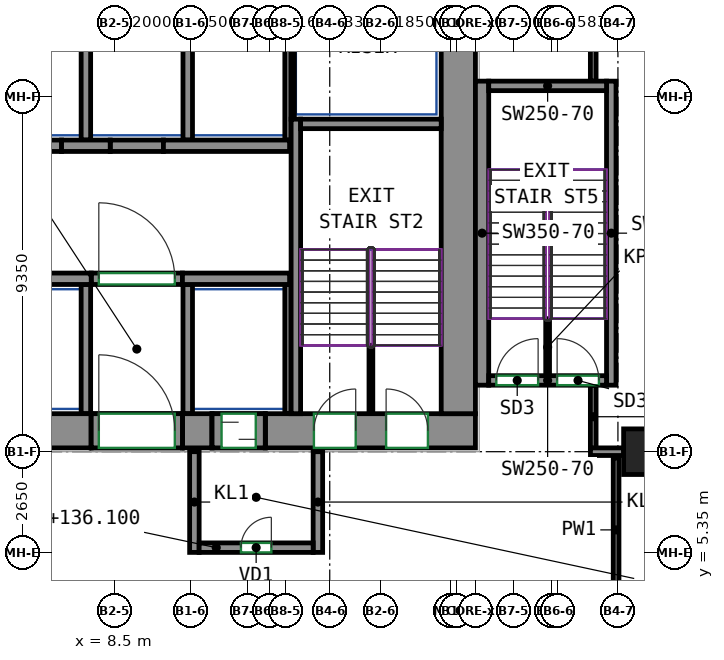
"""IFC4 building model, lengths in metres.
Left out: names, types, materials, properties, quantities, classifications, styles, units other than length and angle.
Written with IfcOpenShell. Run it as: python <this file> out.ifc"""

import sys

from ifc_helpers import new_model, si_unit, direction, frame, frame_2d, origin, origin_2d, place, context, subcontext, project, spatial, rectangle, extrude, source, transform, mapped, element, fill, save


model = new_model("IFC4")
c1 = context("Model", 3, precision=1e-05, world=origin(), true_north=direction((0.0, 1.0)))
c2 = subcontext(c1, "Body", "Model", "MODEL_VIEW")
j1 = project(units=[si_unit("LENGTHUNIT", "METRE"), si_unit("PLANEANGLEUNIT", "RADIAN")], contexts=[c1])
p1 = place(None, origin())
s1 = spatial("IfcSite", under=j1, at=p1, CompositionType="ELEMENT")
p2 = place(p1, origin())
s2 = spatial("IfcBuilding", under=s1, at=p2, CompositionType="ELEMENT")
p3 = place(p2, frame((0.0, 0.0, 128.6)))
s3 = spatial("IfcBuildingStorey", under=s2, at=p3, CompositionType="ELEMENT", Elevation=128.6)
m1 = source(origin(), c2, "Body", "SweptSolid", [
    extrude(rectangle(XDim=1.2, YDim=1.2, at=origin_2d()), origin(), (0.0, 0.0, 1.0), 5.5),
])
p4 = place(p3, frame((22.5, 8.0, 0.0), z_axis=(0.0, 0.0, 1.0), x_axis=(1.0, 0.0, 0.0)))
e1 = element("IfcColumn", 1, at=p4, inside=s3, PredefinedType="COLUMN", context=c2, shape_type="MappedRepresentation", body=[
    mapped(m1, transform((0.0, 0.0, 0.0))),
])
m2 = source(origin(), c2, "Body", "SweptSolid", [
    extrude(rectangle(XDim=14.18, YDim=0.9, at=frame_2d((7.09, 0.0))), origin(), (0.0, 0.0, 1.0), 9.5),
])
p5 = place(p3, frame((-6.29, 8.55, 0.0), z_axis=(0.0, 0.0, 1.0), x_axis=(1.0, 0.0, 0.0)))
e2 = element("IfcWall", 2, at=p5, inside=s3, PredefinedType="SHEAR", context=c2, shape_type="MappedRepresentation", body=[
    mapped(m2, transform((0.0, 0.0, 0.0))),
])
m3 = source(origin(), c2, "Body", "SweptSolid", [
    extrude(rectangle(XDim=0.78, YDim=0.9, at=frame_2d((0.39, 0.0))), origin(), (0.0, 0.0, 1.0), 9.5),
])
p6 = place(p3, frame((10.29, 8.55, 0.0), z_axis=(0.0, 0.0, 1.0), x_axis=(1.0, 0.0, 0.0)))
e3 = element("IfcWall", 3, at=p6, inside=s3, PredefinedType="SHEAR", context=c2, shape_type="MappedRepresentation", body=[
    mapped(m3, transform((0.0, 0.0, 0.0))),
])
m4 = source(origin(), c2, "Body", "SweptSolid", [
    extrude(rectangle(XDim=5.53, YDim=0.9, at=frame_2d((2.765, 0.0))), origin(), (0.0, 0.0, 1.0), 9.5),
])
p7 = place(p3, frame((12.47, 8.55, 0.0), z_axis=(0.0, 0.0, 1.0), x_axis=(1.0, 0.0, 0.0)))
e4 = element("IfcWall", 4, at=p7, inside=s3, PredefinedType="SHEAR", context=c2, shape_type="MappedRepresentation", body=[
    mapped(m4, transform((0.0, 0.0, 0.0))),
])
p8 = place(p7, frame((1.28, 0.0, 0.0)))
e5 = element("IfcOpeningElement", 5, at=p8, cuts=e4, PredefinedType="OPENING", context=c2, shape_type="SweptSolid", body=[
    extrude(rectangle(XDim=1.1, YDim=2.1, at=frame_2d((0.55, 1.05))), frame((0.0, 0.46, 0.0), z_axis=(0.0, -1.0, 0.0), x_axis=(1.0, 0.0, 0.0)), (0.0, 0.0, 1.0), 0.92),
])
p9 = place(p7, frame((3.18, 0.0, 0.0)))
e6 = element("IfcOpeningElement", 6, at=p9, cuts=e4, PredefinedType="OPENING", context=c2, shape_type="SweptSolid", body=[
    extrude(rectangle(XDim=1.1, YDim=2.1, at=frame_2d((0.55, 1.05))), frame((0.0, 0.46, 0.0), z_axis=(0.0, -1.0, 0.0), x_axis=(1.0, 0.0, 0.0)), (0.0, 0.0, 1.0), 0.92),
])
m5 = source(origin(), c2, "Body", "SweptSolid", [
    extrude(rectangle(XDim=12.0, YDim=0.9, at=frame_2d((6.0, 0.0))), origin(), (0.0, 0.0, 1.0), 9.5),
])
p10 = place(p3, frame((17.55, 9.0, 0.0), z_axis=(0.0, 0.0, 1.0), x_axis=(0.0, 1.0, 0.0)))
e7 = element("IfcWall", 7, at=p10, inside=s3, PredefinedType="SHEAR", context=c2, shape_type="MappedRepresentation", body=[
    mapped(m5, transform((0.0, 0.0, 0.0))),
])
m6 = source(origin(), c2, "Body", "SweptSolid", [
    extrude(rectangle(XDim=7.75, YDim=0.25, at=frame_2d((3.875, 0.0))), origin(), (0.0, 0.0, 1.0), 9.5),
])
p11 = place(p3, frame((13.275, 9.0, 0.0), z_axis=(0.0, 0.0, 1.0), x_axis=(0.0, 1.0, 0.0)))
e8 = element("IfcWall", 8, at=p11, inside=s3, PredefinedType="SHEAR", context=c2, shape_type="MappedRepresentation", body=[
    mapped(m6, transform((0.0, 0.0, 0.0))),
])
m7 = source(origin(), c2, "Body", "SweptSolid", [
    extrude(rectangle(XDim=3.7, YDim=0.25, at=frame_2d((1.85, 0.0))), origin(), (0.0, 0.0, 1.0), 9.5),
])
p12 = place(p3, frame((13.4, 16.625, 0.0), z_axis=(0.0, 0.0, 1.0), x_axis=(1.0, 0.0, 0.0)))
e9 = element("IfcWall", 9, at=p12, inside=s3, PredefinedType="SHEAR", context=c2, shape_type="MappedRepresentation", body=[
    mapped(m7, transform((0.0, 0.0, 0.0))),
])
m8 = source(origin(), c2, "Body", "SweptSolid", [
    extrude(rectangle(XDim=8.0, YDim=0.35, at=frame_2d((4.0, 0.0))), origin(), (0.0, 0.0, 1.0), 9.5),
])
p13 = place(p3, frame((18.175, 9.75, 0.0), z_axis=(0.0, 0.0, 1.0), x_axis=(0.0, 1.0, 0.0)))
e10 = element("IfcWall", 10, at=p13, inside=s3, PredefinedType="SHEAR", context=c2, shape_type="MappedRepresentation", body=[
    mapped(m8, transform((0.0, 0.0, 0.0))),
])
m9 = source(origin(), c2, "Body", "SweptSolid", [
    extrude(rectangle(XDim=8.0, YDim=0.25, at=frame_2d((4.0, 0.0))), origin(), (0.0, 0.0, 1.0), 9.5),
])
p14 = place(p3, frame((21.575, 9.75, 0.0), z_axis=(0.0, 0.0, 1.0), x_axis=(0.0, 1.0, 0.0)))
e11 = element("IfcWall", 11, at=p14, inside=s3, PredefinedType="SHEAR", context=c2, shape_type="MappedRepresentation", body=[
    mapped(m9, transform((0.0, 0.0, 0.0))),
])
m10 = source(origin(), c2, "Body", "SweptSolid", [
    extrude(rectangle(XDim=3.1, YDim=0.25, at=frame_2d((1.55, 0.0))), origin(), (0.0, 0.0, 1.0), 9.5),
])
p15 = place(p3, frame((18.35, 9.875, 0.0), z_axis=(0.0, 0.0, 1.0), x_axis=(1.0, 0.0, 0.0)))
e12 = element("IfcWall", 12, at=p15, inside=s3, PredefinedType="SHEAR", context=c2, shape_type="MappedRepresentation", body=[
    mapped(m10, transform((0.0, 0.0, 0.0))),
])
p16 = place(p15, frame((0.2, 0.0, 0.0)))
e13 = element("IfcOpeningElement", 13, at=p16, cuts=e12, PredefinedType="OPENING", context=c2, shape_type="SweptSolid", body=[
    extrude(rectangle(XDim=1.1, YDim=2.1, at=frame_2d((0.55, 1.05))), frame((0.0, 0.135, 0.0), z_axis=(0.0, -1.0, 0.0), x_axis=(1.0, 0.0, 0.0)), (0.0, 0.0, 1.0), 0.27),
])
p17 = place(p15, frame((1.8, 0.0, 0.0)))
e14 = element("IfcOpeningElement", 14, at=p17, cuts=e12, PredefinedType="OPENING", context=c2, shape_type="SweptSolid", body=[
    extrude(rectangle(XDim=1.1, YDim=2.1, at=frame_2d((0.55, 1.05))), frame((0.0, 0.135, 0.0), z_axis=(0.0, -1.0, 0.0), x_axis=(1.0, 0.0, 0.0)), (0.0, 0.0, 1.0), 0.27),
])
p18 = place(p3, frame((18.35, 17.625, 0.0), z_axis=(0.0, 0.0, 1.0), x_axis=(1.0, 0.0, 0.0)))
e15 = element("IfcWall", 15, at=p18, inside=s3, PredefinedType="SHEAR", context=c2, shape_type="MappedRepresentation", body=[
    mapped(m10, transform((0.0, 0.0, 0.0))),
])
m11 = source(origin(), c2, "Body", "SweptSolid", [
    extrude(rectangle(XDim=18.9, YDim=0.3, at=frame_2d((9.45, 0.0))), origin(), (0.0, 0.0, 1.0), 9.5),
])
p19 = place(p3, frame((-11.01, 12.55, 0.0), z_axis=(0.0, 0.0, 1.0), x_axis=(1.0, 0.0, 0.0)))
e16 = element("IfcWall", 16, at=p19, inside=s3, PredefinedType="SHEAR", context=c2, shape_type="MappedRepresentation", body=[
    mapped(m11, transform((0.0, 0.0, 0.0))),
])
m12 = source(origin(), c2, "Body", "SweptSolid", [
    extrude(rectangle(XDim=2.82, YDim=0.3, at=frame_2d((1.41, 0.0))), origin(), (0.0, 0.0, 1.0), 9.5),
])
p20 = place(p3, frame((10.29, 12.55, 0.0), z_axis=(0.0, 0.0, 1.0), x_axis=(1.0, 0.0, 0.0)))
e17 = element("IfcWall", 17, at=p20, inside=s3, PredefinedType="SHEAR", context=c2, shape_type="MappedRepresentation", body=[
    mapped(m12, transform((0.0, 0.0, 0.0))),
])
m13 = source(origin(), c2, "Body", "SweptSolid", [
    extrude(rectangle(XDim=1.28, YDim=0.3, at=frame_2d((0.64, 0.0))), origin(), (0.0, 0.0, 1.0), 9.5),
])
p21 = place(p3, frame((7.11, 16.05, 0.0), z_axis=(0.0, 0.0, 1.0), x_axis=(1.0, 0.0, 0.0)))
e18 = element("IfcWall", 18, at=p21, inside=s3, PredefinedType="SHEAR", context=c2, shape_type="MappedRepresentation", body=[
    mapped(m13, transform((0.0, 0.0, 0.0))),
])
m14 = source(origin(), c2, "Body", "SweptSolid", [
    extrude(rectangle(XDim=3.32, YDim=0.3, at=frame_2d((1.66, 0.0))), origin(), (0.0, 0.0, 1.0), 9.5),
])
p22 = place(p3, frame((9.79, 16.05, 0.0), z_axis=(0.0, 0.0, 1.0), x_axis=(1.0, 0.0, 0.0)))
e19 = element("IfcWall", 19, at=p22, inside=s3, PredefinedType="SHEAR", context=c2, shape_type="MappedRepresentation", body=[
    mapped(m14, transform((0.0, 0.0, 0.0))),
])
m15 = source(origin(), c2, "Body", "SweptSolid", [
    extrude(rectangle(XDim=2.4, YDim=0.9, at=frame_2d((1.2, 0.0))), origin(), (0.0, 0.0, 1.0), 5.3),
])
p23 = place(p3, frame((7.89, 8.55, 4.2), z_axis=(0.0, 0.0, 1.0), x_axis=(1.0, 0.0, 0.0)))
e20 = element("IfcWall", 20, at=p23, inside=s3, PredefinedType="SHEAR", context=c2, shape_type="MappedRepresentation", body=[
    mapped(m15, transform((0.0, 0.0, 0.0))),
])
m16 = source(origin(), c2, "Body", "SweptSolid", [
    extrude(rectangle(XDim=1.4, YDim=0.9, at=frame_2d((0.7, 0.0))), origin(), (0.0, 0.0, 1.0), 5.55),
])
p24 = place(p3, frame((11.07, 8.55, 3.95), z_axis=(0.0, 0.0, 1.0), x_axis=(1.0, 0.0, 0.0)))
e21 = element("IfcWall", 21, at=p24, inside=s3, PredefinedType="SHEAR", context=c2, shape_type="MappedRepresentation", body=[
    mapped(m16, transform((0.0, 0.0, 0.0))),
])
m17 = source(origin(), c2, "Body", "SweptSolid", [
    extrude(rectangle(XDim=2.4, YDim=0.3, at=frame_2d((1.2, 0.0))), origin(), (0.0, 0.0, 1.0), 9.5),
])
p25 = place(p3, frame((7.89, 12.55, 0.0), z_axis=(0.0, 0.0, 1.0), x_axis=(1.0, 0.0, 0.0)))
e22 = element("IfcWall", 22, at=p25, inside=s3, PredefinedType="PARTITIONING", context=c2, shape_type="MappedRepresentation", body=[
    mapped(m17, transform((0.0, 0.0, 0.0))),
])
p26 = place(p25, frame((0.2, 0.0, 0.0)))
e23 = element("IfcOpeningElement", 23, at=p26, cuts=e22, PredefinedType="OPENING", context=c2, shape_type="SweptSolid", body=[
    extrude(rectangle(XDim=2.0, YDim=2.1, at=frame_2d((1.0, 1.05))), frame((0.0, 0.16, 0.0), z_axis=(0.0, -1.0, 0.0), x_axis=(1.0, 0.0, 0.0)), (0.0, 0.0, 1.0), 0.32),
])
m18 = source(origin(), c2, "Body", "SweptSolid", [
    extrude(rectangle(XDim=1.4, YDim=0.3, at=frame_2d((0.7, 0.0))), origin(), (0.0, 0.0, 1.0), 9.5),
])
for number, where, z_axis, x_axis in (
    (24, (5.71, 16.05, 0.0), (0.0, 0.0, 1.0), (1.0, 0.0, 0.0)),
    (25, (8.39, 16.05, 0.0), (0.0, 0.0, 1.0), (1.0, 0.0, 0.0)),
):
    element("IfcWall", number, at=place(p3, frame(where, z_axis=z_axis, x_axis=x_axis)), inside=s3, PredefinedType="PARTITIONING", context=c2, shape_type="MappedRepresentation", body=[
        mapped(m18, transform((0.0, 0.0, 0.0))),
    ])
m19 = source(origin(), c2, "Body", "SweptSolid", [
    extrude(rectangle(XDim=2.65, YDim=0.25, at=frame_2d((1.325, 0.0))), origin(), (0.0, 0.0, 1.0), 9.5),
])
p27 = place(p3, frame((10.605, 5.35, 0.0), z_axis=(0.0, 0.0, 1.0), x_axis=(0.0, 1.0, 0.0)))
e26 = element("IfcWall", 26, at=p27, inside=s3, PredefinedType="PARTITIONING", context=c2, shape_type="MappedRepresentation", body=[
    mapped(m19, transform((0.0, 0.0, 0.0))),
])
m20 = source(origin(), c2, "Body", "SweptSolid", [
    extrude(rectangle(XDim=2.65, YDim=0.25, at=frame_2d((1.325, 0.0))), origin(), (0.0, 0.0, 1.0), 7.5),
])
p28 = place(p3, frame((13.855, 5.35, 0.0), z_axis=(0.0, 0.0, 1.0), x_axis=(0.0, 1.0, 0.0)))
e27 = element("IfcWall", 27, at=p28, inside=s3, PredefinedType="PARTITIONING", context=c2, shape_type="MappedRepresentation", body=[
    mapped(m20, transform((0.0, 0.0, 0.0))),
])
m21 = source(origin(), c2, "Body", "SweptSolid", [
    extrude(rectangle(XDim=3.0, YDim=0.25, at=frame_2d((1.5, 0.0))), origin(), (0.0, 0.0, 1.0), 7.5),
])
p29 = place(p3, frame((10.73, 5.475, 0.0), z_axis=(0.0, 0.0, 1.0), x_axis=(1.0, 0.0, 0.0)))
e28 = element("IfcWall", 28, at=p29, inside=s3, PredefinedType="PARTITIONING", context=c2, shape_type="MappedRepresentation", body=[
    mapped(m21, transform((0.0, 0.0, 0.0))),
])
p30 = place(p29, frame((1.1, 0.0, 0.0)))
e29 = element("IfcOpeningElement", 29, at=p30, cuts=e28, PredefinedType="OPENING", context=c2, shape_type="SweptSolid", body=[
    extrude(rectangle(XDim=0.8, YDim=2.0, at=frame_2d((0.4, 1.0))), frame((0.0, 0.135, 0.0), z_axis=(0.0, -1.0, 0.0), x_axis=(1.0, 0.0, 0.0)), (0.0, 0.0, 1.0), 0.27),
])
m22 = source(origin(), c2, "Body", "SweptSolid", [
    extrude(rectangle(XDim=3.275, YDim=0.165, at=frame_2d((1.638, 0.0))), origin(), (0.0, 0.0, 1.0), 9.5),
])
p31 = place(p3, frame((13.067, 16.2, 0.0), z_axis=(0.0, 0.0, 1.0), x_axis=(0.0, 1.0, 0.0)))
e30 = element("IfcWall", 30, at=p31, inside=s3, PredefinedType="PARTITIONING", context=c2, shape_type="MappedRepresentation", body=[
    mapped(m22, transform((0.0, 0.0, 0.0))),
])
m23 = source(origin(), c2, "Body", "SweptSolid", [
    extrude(rectangle(XDim=3.275, YDim=0.25, at=frame_2d((1.638, 0.0))), origin(), (0.0, 0.0, 1.0), 9.5),
])
p32 = place(p3, frame((10.43, 16.2, 0.0), z_axis=(0.0, 0.0, 1.0), x_axis=(0.0, 1.0, 0.0)))
e31 = element("IfcWall", 31, at=p32, inside=s3, PredefinedType="PARTITIONING", context=c2, shape_type="MappedRepresentation", body=[
    mapped(m23, transform((0.0, 0.0, 0.0))),
])
m24 = source(origin(), c2, "Body", "SweptSolid", [
    extrude(rectangle(XDim=2.725, YDim=0.085, at=frame_2d((1.363, 0.0))), origin(), (0.0, 0.0, 1.0), 9.5),
])
p33 = place(p3, frame((13.192, 16.75, 0.0), z_axis=(0.0, 0.0, 1.0), x_axis=(0.0, 1.0, 0.0)))
e32 = element("IfcWall", 32, at=p33, inside=s3, PredefinedType="PARTITIONING", context=c2, shape_type="MappedRepresentation", body=[
    mapped(m24, transform((0.0, 0.0, 0.0))),
])
p34 = place(p3, frame((7.75, 16.2, 0.0), z_axis=(0.0, 0.0, 1.0), x_axis=(0.0, 1.0, 0.0)))
e33 = element("IfcWall", 33, at=p34, inside=s3, PredefinedType="PARTITIONING", context=c2, shape_type="MappedRepresentation", body=[
    mapped(m23, transform((0.0, 0.0, 0.0))),
])
m25 = source(origin(), c2, "Body", "SweptSolid", [
    extrude(rectangle(XDim=3.4, YDim=0.25, at=frame_2d((1.7, 0.0))), origin(), (0.0, 0.0, 1.0), 9.5),
])
p35 = place(p3, frame((10.43, 9.0, 0.0), z_axis=(0.0, 0.0, 1.0), x_axis=(0.0, 1.0, 0.0)))
e34 = element("IfcWall", 34, at=p35, inside=s3, PredefinedType="PARTITIONING", context=c2, shape_type="MappedRepresentation", body=[
    mapped(m25, transform((0.0, 0.0, 0.0))),
])
m26 = source(origin(), c2, "Body", "SweptSolid", [
    extrude(rectangle(XDim=3.4, YDim=0.165, at=frame_2d((1.7, 0.0))), origin(), (0.0, 0.0, 1.0), 9.5),
])
p36 = place(p3, frame((13.067, 9.0, 0.0), z_axis=(0.0, 0.0, 1.0), x_axis=(0.0, 1.0, 0.0)))
e35 = element("IfcWall", 35, at=p36, inside=s3, PredefinedType="PARTITIONING", context=c2, shape_type="MappedRepresentation", body=[
    mapped(m26, transform((0.0, 0.0, 0.0))),
])
p37 = place(p3, frame((7.75, 9.0, 0.0), z_axis=(0.0, 0.0, 1.0), x_axis=(0.0, 1.0, 0.0)))
e36 = element("IfcWall", 36, at=p37, inside=s3, PredefinedType="PARTITIONING", context=c2, shape_type="MappedRepresentation", body=[
    mapped(m25, transform((0.0, 0.0, 0.0))),
])
m27 = source(origin(), c2, "Body", "SweptSolid", [
    extrude(rectangle(XDim=2.4, YDim=0.9, at=frame_2d((1.2, 0.0))), origin(), (0.0, 0.0, 1.0), 2.7),
])
p38 = place(p3, frame((7.89, 8.55, 0.0), z_axis=(0.0, 0.0, 1.0), x_axis=(1.0, 0.0, 0.0)))
e37 = element("IfcWall", 37, at=p38, inside=s3, PredefinedType="PARTITIONING", context=c2, shape_type="MappedRepresentation", body=[
    mapped(m27, transform((0.0, 0.0, 0.0))),
])
p39 = place(p38, frame((0.2, 0.0, 0.0)))
e38 = element("IfcOpeningElement", 38, at=p39, cuts=e37, PredefinedType="OPENING", context=c2, shape_type="SweptSolid", body=[
    extrude(rectangle(XDim=2.0, YDim=2.1, at=frame_2d((1.0, 1.05))), frame((0.0, 0.46, 0.0), z_axis=(0.0, -1.0, 0.0), x_axis=(1.0, 0.0, 0.0)), (0.0, 0.0, 1.0), 0.92),
])
m28 = source(origin(), c2, "Body", "SweptSolid", [
    extrude(rectangle(XDim=1.4, YDim=0.9, at=frame_2d((0.7, 0.0))), origin(), (0.0, 0.0, 1.0), 2.7),
])
p40 = place(p3, frame((11.07, 8.55, 0.0), z_axis=(0.0, 0.0, 1.0), x_axis=(1.0, 0.0, 0.0)))
e39 = element("IfcWall", 39, at=p40, inside=s3, PredefinedType="PARTITIONING", context=c2, shape_type="MappedRepresentation", body=[
    mapped(m28, transform((0.0, 0.0, 0.0))),
])
p41 = place(p40, frame((0.25, 0.0, 0.0)))
e40 = element("IfcOpeningElement", 40, at=p41, cuts=e39, PredefinedType="OPENING", context=c2, shape_type="SweptSolid", body=[
    extrude(rectangle(XDim=0.9, YDim=2.1, at=frame_2d((0.45, 1.05))), frame((0.0, 0.46, 0.0), z_axis=(0.0, -1.0, 0.0), x_axis=(1.0, 0.0, 0.0)), (0.0, 0.0, 1.0), 0.92),
])
m29 = source(origin(), c2, "Body", "SweptSolid", [
    extrude(rectangle(XDim=1.8, YDim=0.1, at=frame_2d((0.9, 0.0))), origin(), (0.0, 0.0, 1.0), 3.1),
])
p42 = place(p3, frame((15.25, 9.0, 0.0), z_axis=(0.0, 0.0, 1.0), x_axis=(0.0, 1.0, 0.0)))
e41 = element("IfcWall", 41, at=p42, inside=s3, PredefinedType="PARTITIONING", context=c2, shape_type="MappedRepresentation", body=[
    mapped(m29, transform((0.0, 0.0, 0.0))),
])
m30 = source(origin(), c2, "Body", "SweptSolid", [
    extrude(rectangle(XDim=1.5, YDim=0.1, at=frame_2d((0.75, 0.0))), origin(), (0.0, 0.0, 1.0), 4.75),
])
p43 = place(p3, frame((19.9, 10.0, 0.0), z_axis=(0.0, 0.0, 1.0), x_axis=(0.0, 1.0, 0.0)))
e42 = element("IfcWall", 42, at=p43, inside=s3, PredefinedType="PARTITIONING", context=c2, shape_type="MappedRepresentation", body=[
    mapped(m30, transform((0.0, 0.0, 0.0))),
])
p44 = place(p3, frame((21.702, 4.048, 0.0), z_axis=(0.0, 0.0, 1.0), x_axis=(0.0, 1.0, 0.0)))
e43 = element("IfcWall", 43, at=p44, inside=s3, PredefinedType="PARTITIONING", context=c2, shape_type="SweptSolid", body=[
    extrude(rectangle(XDim=3.789, YDim=0.15, at=frame_2d((1.895, 0.0))), origin(), (0.0, 0.0, 1.0), 9.5),
])
p45 = place(p3, frame((21.1, 17.75, 0.0), z_axis=(0.0, 0.0, 1.0), x_axis=(0.0, 1.0, 0.0)))
e44 = element("IfcWall", 44, at=p45, inside=s3, PredefinedType="PARTITIONING", context=c2, shape_type="SweptSolid", body=[
    extrude(rectangle(XDim=6.175, YDim=0.15, at=frame_2d((3.087, 0.0))), origin(), (0.0, 0.0, 1.0), 9.5),
])
p46 = place(p3, frame((21.1, 8.09, 0.0), z_axis=(0.0, 0.0, 1.0), x_axis=(0.0, 1.0, 0.0)))
e45 = element("IfcWall", 45, at=p46, inside=s3, PredefinedType="PARTITIONING", context=c2, shape_type="SweptSolid", body=[
    extrude(rectangle(XDim=1.66, YDim=0.15, at=frame_2d((0.83, 0.0))), origin(), (0.0, 0.0, 1.0), 9.5),
])
p47 = place(p3, frame((21.027, 8.0, 0.0), z_axis=(0.0, 0.0, 1.0), x_axis=(1.0, 0.0, 0.0)))
e46 = element("IfcWall", 46, at=p47, inside=s3, PredefinedType="PARTITIONING", context=c2, shape_type="SweptSolid", body=[
    extrude(rectangle(XDim=0.873, YDim=0.2, at=frame_2d((0.437, 0.0))), origin(), (0.0, 0.0, 1.0), 9.5),
])
p48 = place(p26, origin())
e47 = element("IfcDoor", 47, at=p48, inside=s3, OperationType="DOUBLE_DOOR_SINGLE_SWING", PredefinedType="DOOR", context=c2, shape_type="SweptSolid", body=[
    extrude(rectangle(XDim=2.0, YDim=2.1, at=frame_2d((1.0, 1.05))), frame((0.0, 0.025, 0.0), z_axis=(0.0, -1.0, 0.0), x_axis=(1.0, 0.0, 0.0)), (0.0, 0.0, 1.0), 0.05),
])
fill(e23, e47)
p49 = place(p39, origin())
e48 = element("IfcDoor", 48, at=p49, inside=s3, OperationType="DOUBLE_DOOR_SINGLE_SWING", PredefinedType="DOOR", context=c2, shape_type="SweptSolid", body=[
    extrude(rectangle(XDim=2.0, YDim=2.1, at=frame_2d((1.0, 1.05))), frame((0.0, 0.355, 0.0), z_axis=(0.0, -1.0, 0.0), x_axis=(1.0, 0.0, 0.0)), (0.0, 0.0, 1.0), 0.05),
])
fill(e38, e48)
p50 = place(p30, origin())
e49 = element("IfcDoor", 49, at=p50, inside=s3, OperationType="SINGLE_SWING_RIGHT", PredefinedType="DOOR", context=c2, shape_type="SweptSolid", body=[
    extrude(rectangle(XDim=0.8, YDim=2.0, at=frame_2d((0.4, 1.0))), frame((0.0, 0.025, 0.0), z_axis=(0.0, -1.0, 0.0), x_axis=(1.0, 0.0, 0.0)), (0.0, 0.0, 1.0), 0.05),
])
fill(e29, e49)
p51 = place(p41, origin())
e50 = element("IfcDoor", 50, at=p51, inside=s3, OperationType="SLIDING_TO_LEFT", PredefinedType="DOOR", context=c2, shape_type="SweptSolid", body=[
    extrude(rectangle(XDim=0.9, YDim=2.1, at=frame_2d((0.45, 1.05))), frame((0.0, 0.355, 0.0), z_axis=(0.0, -1.0, 0.0), x_axis=(1.0, 0.0, 0.0)), (0.0, 0.0, 1.0), 0.05),
])
fill(e40, e50)
p52 = place(p8, origin())
e51 = element("IfcDoor", 51, at=p52, inside=s3, OperationType="SINGLE_SWING_RIGHT", PredefinedType="DOOR", context=c2, shape_type="SweptSolid", body=[
    extrude(rectangle(XDim=1.1, YDim=2.1, at=frame_2d((0.55, 1.05))), frame((0.0, 0.355, 0.0), z_axis=(0.0, -1.0, 0.0), x_axis=(1.0, 0.0, 0.0)), (0.0, 0.0, 1.0), 0.05),
])
fill(e5, e51)
p53 = place(p9, origin())
e52 = element("IfcDoor", 52, at=p53, inside=s3, OperationType="SINGLE_SWING_LEFT", PredefinedType="DOOR", context=c2, shape_type="SweptSolid", body=[
    extrude(rectangle(XDim=1.1, YDim=2.1, at=frame_2d((0.55, 1.05))), frame((0.0, 0.355, 0.0), z_axis=(0.0, -1.0, 0.0), x_axis=(1.0, 0.0, 0.0)), (0.0, 0.0, 1.0), 0.05),
])
fill(e6, e52)
p54 = place(p16, origin())
e53 = element("IfcDoor", 53, at=p54, inside=s3, OperationType="SINGLE_SWING_RIGHT", PredefinedType="DOOR", context=c2, shape_type="SweptSolid", body=[
    extrude(rectangle(XDim=1.1, YDim=2.1, at=frame_2d((0.55, 1.05))), frame((0.0, 0.025, 0.0), z_axis=(0.0, -1.0, 0.0), x_axis=(1.0, 0.0, 0.0)), (0.0, 0.0, 1.0), 0.05),
])
fill(e13, e53)
p55 = place(p17, origin())
e54 = element("IfcDoor", 54, at=p55, inside=s3, OperationType="SINGLE_SWING_LEFT", PredefinedType="DOOR", context=c2, shape_type="SweptSolid", body=[
    extrude(rectangle(XDim=1.1, YDim=2.1, at=frame_2d((0.55, 1.05))), frame((0.0, 0.025, 0.0), z_axis=(0.0, -1.0, 0.0), x_axis=(1.0, 0.0, 0.0)), (0.0, 0.0, 1.0), 0.05),
])
fill(e14, e54)
save(model, sys.argv[1])
